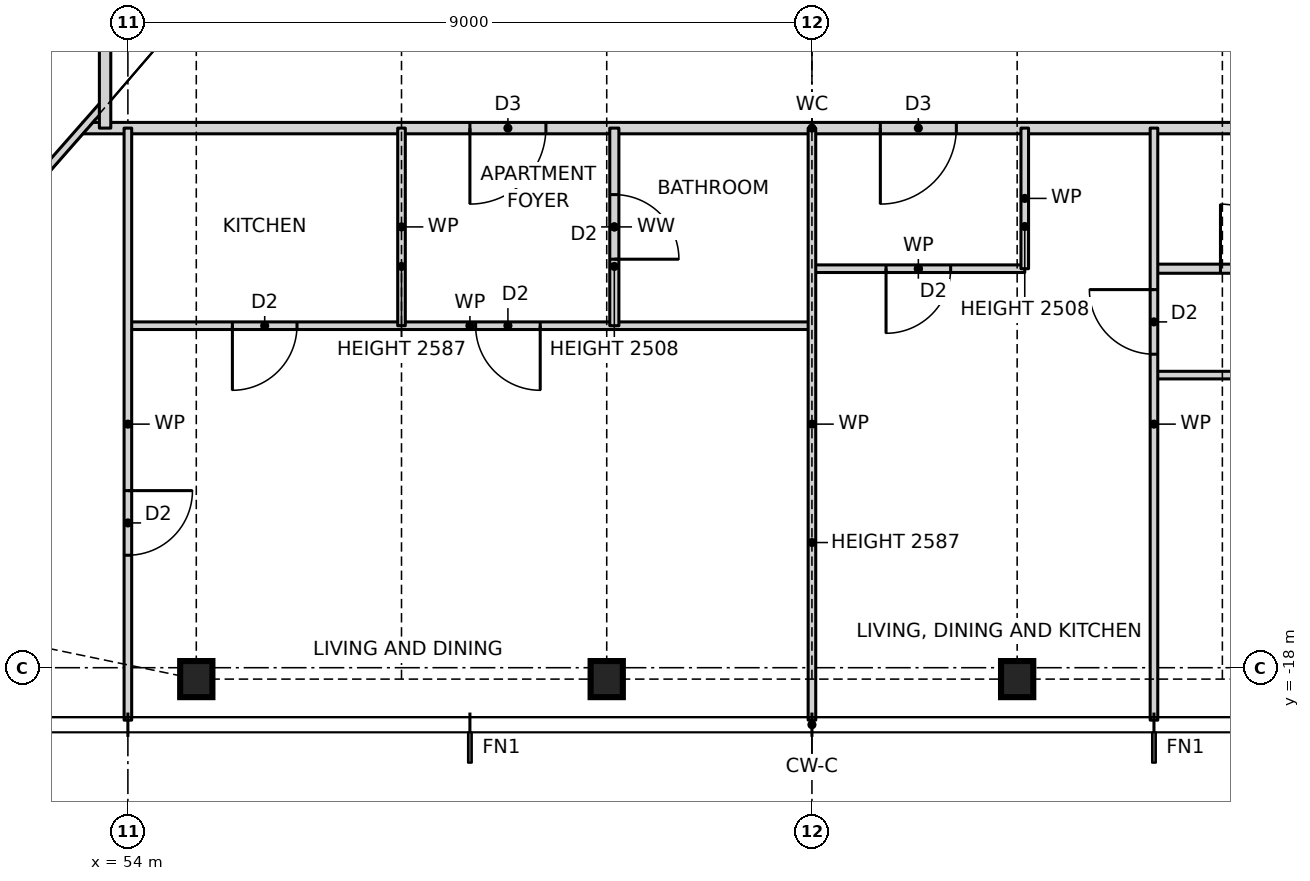
"""IFC4 building model, lengths in metres.
Left out: names, types, materials, properties, quantities, classifications, styles, units other than length and angle.
Written with IfcOpenShell. Run it as: python <this file> out.ifc"""

import sys

from ifc_helpers import new_model, si_unit, direction, frame, frame_2d, origin, origin_2d, place, context, subcontext, project, spatial, rectangle, i_section, extrude, element, fill, save


model = new_model("IFC4")
c1 = context("Model", 3, precision=1e-05, world=origin(), true_north=direction((0.0, 1.0)))
c2 = subcontext(c1, "Body", "Model", "MODEL_VIEW")
j1 = project(units=[si_unit("LENGTHUNIT", "METRE"), si_unit("PLANEANGLEUNIT", "RADIAN")], contexts=[c1])
p1 = place(None, origin())
s1 = spatial("IfcSite", under=j1, at=p1, CompositionType="ELEMENT")
p2 = place(p1, origin())
s2 = spatial("IfcBuilding", under=s1, at=p2, CompositionType="ELEMENT")
p3 = place(p2, frame((0.0, 0.0, 64.0)))
s3 = spatial("IfcBuildingStorey", under=s2, at=p3, CompositionType="ELEMENT", Elevation=64.0)
for number, where, z_axis, x_axis in (
    (1, (54.9, -18.15, 0.0), (0.0, 0.0, 1.0), (1.0, 0.0, 0.0)),
    (2, (60.3, -18.15, 0.0), (0.0, 0.0, 1.0), (1.0, 0.0, 0.0)),
    (3, (65.7, -18.15, 0.0), (0.0, 0.0, 1.0), (1.0, 0.0, 0.0)),
):
    element("IfcColumn", number, at=place(p3, frame(where, z_axis=z_axis, x_axis=x_axis)), inside=s3, PredefinedType="COLUMN", context=c2, shape_type="SweptSolid", body=[
        extrude(i_section(OverallWidth=0.424, OverallDepth=0.475, WebThickness=0.048, FlangeThickness=0.077, at=origin_2d()), origin(), (0.0, 0.0, 1.0), 3.5),
    ])
p4 = place(p3, frame((67.5, -14.15, 0.0), z_axis=(0.0, 0.0, 1.0), x_axis=(1.0, 0.0, 0.0)))
e4 = element("IfcWall", 4, at=p4, inside=s3, PredefinedType="PARTITIONING", context=c2, shape_type="SweptSolid", body=[
    extrude(rectangle(XDim=6.7, YDim=0.1, at=frame_2d((3.35, 0.0))), origin(), (0.0, 0.0, 1.0), 3.27),
])
p5 = place(p4, frame((1.825, 0.0, 0.0)))
e5 = element("IfcOpeningElement", 5, at=p5, cuts=e4, PredefinedType="OPENING", context=c2, shape_type="SweptSolid", body=[
    extrude(rectangle(XDim=0.85, YDim=2.1, at=frame_2d((0.425, 1.05))), frame((0.0, 0.06, 0.0), z_axis=(0.0, -1.0, 0.0), x_axis=(1.0, 0.0, 0.0)), (0.0, 0.0, 1.0), 0.12),
])
p6 = place(p4, frame((5.175, 0.0, 0.0)))
e6 = element("IfcOpeningElement", 6, at=p6, cuts=e4, PredefinedType="OPENING", context=c2, shape_type="SweptSolid", body=[
    extrude(rectangle(XDim=0.85, YDim=2.1, at=frame_2d((0.425, 1.05))), frame((0.0, 0.06, 0.0), z_axis=(0.0, -1.0, 0.0), x_axis=(1.0, 0.0, 0.0)), (0.0, 0.0, 1.0), 0.12),
])
p7 = place(p3, frame((54.0, -13.5, 0.0), z_axis=(0.0, 0.0, 1.0), x_axis=(1.0, 0.0, 0.0)))
e7 = element("IfcWall", 7, at=p7, inside=s3, PredefinedType="PARTITIONING", context=c2, shape_type="SweptSolid", body=[
    extrude(rectangle(XDim=9.0, YDim=0.1, at=frame_2d((4.5, 0.0))), origin(), (0.0, 0.0, 1.0), 3.27),
])
p8 = place(p7, frame((1.375, 0.0, 0.0)))
e8 = element("IfcOpeningElement", 8, at=p8, cuts=e7, PredefinedType="OPENING", context=c2, shape_type="SweptSolid", body=[
    extrude(rectangle(XDim=0.85, YDim=2.1, at=frame_2d((0.425, 1.05))), frame((0.0, 0.06, 0.0), z_axis=(0.0, -1.0, 0.0), x_axis=(1.0, 0.0, 0.0)), (0.0, 0.0, 1.0), 0.12),
])
p9 = place(p7, frame((4.575, 0.0, 0.0)))
e9 = element("IfcOpeningElement", 9, at=p9, cuts=e7, PredefinedType="OPENING", context=c2, shape_type="SweptSolid", body=[
    extrude(rectangle(XDim=0.85, YDim=2.1, at=frame_2d((0.425, 1.05))), frame((0.0, 0.06, 0.0), z_axis=(0.0, -1.0, 0.0), x_axis=(1.0, 0.0, 0.0)), (0.0, 0.0, 1.0), 0.12),
])
p10 = place(p3, frame((63.0, -12.75, 0.0), z_axis=(0.0, 0.0, 1.0), x_axis=(1.0, 0.0, 0.0)))
e10 = element("IfcWall", 10, at=p10, inside=s3, PredefinedType="PARTITIONING", context=c2, shape_type="SweptSolid", body=[
    extrude(rectangle(XDim=2.8, YDim=0.1, at=frame_2d((1.4, 0.0))), origin(), (0.0, 0.0, 1.0), 3.27),
])
p11 = place(p10, frame((0.975, 0.0, 0.0)))
e11 = element("IfcOpeningElement", 11, at=p11, cuts=e10, PredefinedType="OPENING", context=c2, shape_type="SweptSolid", body=[
    extrude(rectangle(XDim=0.85, YDim=2.1, at=frame_2d((0.425, 1.05))), frame((0.0, 0.06, 0.0), z_axis=(0.0, -1.0, 0.0), x_axis=(1.0, 0.0, 0.0)), (0.0, 0.0, 1.0), 0.12),
])
p12 = place(p3, frame((67.5, -12.75, 0.0), z_axis=(0.0, 0.0, 1.0), x_axis=(1.0, 0.0, 0.0)))
e12 = element("IfcWall", 12, at=p12, inside=s3, PredefinedType="PARTITIONING", context=c2, shape_type="SweptSolid", body=[
    extrude(rectangle(XDim=6.7, YDim=0.12, at=frame_2d((3.35, 0.0))), origin(), (0.0, 0.0, 1.0), 3.27),
])
p13 = place(p12, frame((0.875, 0.0, 0.0)))
e13 = element("IfcOpeningElement", 13, at=p13, cuts=e12, PredefinedType="OPENING", context=c2, shape_type="SweptSolid", body=[
    extrude(rectangle(XDim=0.85, YDim=2.1, at=frame_2d((0.425, 1.05))), frame((0.0, 0.07, 0.0), z_axis=(0.0, -1.0, 0.0), x_axis=(1.0, 0.0, 0.0)), (0.0, 0.0, 1.0), 0.14),
])
p14 = place(p12, frame((4.225, 0.0, 0.0)))
e14 = element("IfcOpeningElement", 14, at=p14, cuts=e12, PredefinedType="OPENING", context=c2, shape_type="SweptSolid", body=[
    extrude(rectangle(XDim=0.85, YDim=2.1, at=frame_2d((0.425, 1.05))), frame((0.0, 0.07, 0.0), z_axis=(0.0, -1.0, 0.0), x_axis=(1.0, 0.0, 0.0)), (0.0, 0.0, 1.0), 0.14),
])
p15 = place(p3, frame((53.408, -10.9, 0.0), z_axis=(0.0, 0.0, 1.0), x_axis=(1.0, 0.0, 0.0)))
e15 = element("IfcWall", 15, at=p15, inside=s3, PredefinedType="PARTITIONING", context=c2, shape_type="SweptSolid", body=[
    extrude(rectangle(XDim=19.184, YDim=0.15, at=frame_2d((9.592, 0.0))), origin(), (0.0, 0.0, 1.0), 3.27),
])
p16 = place(p15, frame((5.092, 0.0, 0.0)))
e16 = element("IfcOpeningElement", 16, at=p16, cuts=e15, PredefinedType="OPENING", context=c2, shape_type="SweptSolid", body=[
    extrude(rectangle(XDim=1.0, YDim=2.1, at=frame_2d((0.5, 1.05))), frame((0.0, 0.085, 0.0), z_axis=(0.0, -1.0, 0.0), x_axis=(1.0, 0.0, 0.0)), (0.0, 0.0, 1.0), 0.17),
])
p17 = place(p15, frame((10.492, 0.0, 0.0)))
e17 = element("IfcOpeningElement", 17, at=p17, cuts=e15, PredefinedType="OPENING", context=c2, shape_type="SweptSolid", body=[
    extrude(rectangle(XDim=1.0, YDim=2.1, at=frame_2d((0.5, 1.05))), frame((0.0, 0.085, 0.0), z_axis=(0.0, -1.0, 0.0), x_axis=(1.0, 0.0, 0.0)), (0.0, 0.0, 1.0), 0.17),
])
p18 = place(p3, frame((47.944, -17.109, 0.0), z_axis=(0.0, 0.0, 1.0), x_axis=(0.660612734851, 0.750726857487, 0.0)))
e18 = element("IfcWall", 18, at=p18, inside=s3, PredefinedType="PARTITIONING", context=c2, shape_type="SweptSolid", body=[
    extrude(rectangle(XDim=8.713, YDim=0.1, at=frame_2d((4.356, 0.0))), origin(), (0.0, 0.0, 1.0), 2.429),
])
p19 = place(p3, frame((67.5, -18.69, 0.0), z_axis=(0.0, 0.0, 1.0), x_axis=(0.0, 1.0, 0.0)))
e19 = element("IfcWall", 19, at=p19, inside=s3, PredefinedType="PARTITIONING", context=c2, shape_type="SweptSolid", body=[
    extrude(rectangle(XDim=7.79, YDim=0.1, at=frame_2d((3.895, 0.0))), origin(), (0.0, 0.0, 1.0), 3.27),
])
p20 = place(p19, frame((4.815, 0.0, 0.0)))
e20 = element("IfcOpeningElement", 20, at=p20, cuts=e19, PredefinedType="OPENING", context=c2, shape_type="SweptSolid", body=[
    extrude(rectangle(XDim=0.85, YDim=2.1, at=frame_2d((0.425, 1.05))), frame((0.0, 0.06, 0.0), z_axis=(0.0, -1.0, 0.0), x_axis=(1.0, 0.0, 0.0)), (0.0, 0.0, 1.0), 0.12),
])
p21 = place(p3, frame((65.8, -12.75, 0.0), z_axis=(0.0, 0.0, 1.0), x_axis=(0.0, 1.0, 0.0)))
e21 = element("IfcWall", 21, at=p21, inside=s3, PredefinedType="PARTITIONING", context=c2, shape_type="SweptSolid", body=[
    extrude(rectangle(XDim=1.85, YDim=0.1, at=frame_2d((0.925, 0.0))), origin(), (0.0, 0.0, 1.0), 2.508),
])
p22 = place(p3, frame((63.0, -18.69, 0.0), z_axis=(0.0, 0.0, 1.0), x_axis=(0.0, 1.0, 0.0)))
e22 = element("IfcWall", 22, at=p22, inside=s3, PredefinedType="PARTITIONING", context=c2, shape_type="SweptSolid", body=[
    extrude(rectangle(XDim=7.79, YDim=0.1, at=frame_2d((3.895, 0.0))), origin(), (0.0, 0.0, 1.0), 2.587),
])
p23 = place(p3, frame((60.4, -13.5, 0.0), z_axis=(0.0, 0.0, 1.0), x_axis=(0.0, 1.0, 0.0)))
e23 = element("IfcWall", 23, at=p23, inside=s3, PredefinedType="PARTITIONING", context=c2, shape_type="SweptSolid", body=[
    extrude(rectangle(XDim=2.6, YDim=0.12, at=frame_2d((1.3, 0.0))), origin(), (0.0, 0.0, 1.0), 2.508),
])
p24 = place(p23, frame((0.875, 0.0, 0.0)))
e24 = element("IfcOpeningElement", 24, at=p24, cuts=e23, PredefinedType="OPENING", context=c2, shape_type="SweptSolid", body=[
    extrude(rectangle(XDim=0.85, YDim=2.1, at=frame_2d((0.425, 1.05))), frame((0.0, 0.07, 0.0), z_axis=(0.0, -1.0, 0.0), x_axis=(1.0, 0.0, 0.0)), (0.0, 0.0, 1.0), 0.14),
])
p25 = place(p3, frame((57.6, -13.5, 0.0), z_axis=(0.0, 0.0, 1.0), x_axis=(0.0, 1.0, 0.0)))
e25 = element("IfcWall", 25, at=p25, inside=s3, PredefinedType="PARTITIONING", context=c2, shape_type="SweptSolid", body=[
    extrude(rectangle(XDim=2.6, YDim=0.1, at=frame_2d((1.3, 0.0))), origin(), (0.0, 0.0, 1.0), 2.587),
])
p26 = place(p3, frame((54.0, -18.69, 0.0), z_axis=(0.0, 0.0, 1.0), x_axis=(0.0, 1.0, 0.0)))
e26 = element("IfcWall", 26, at=p26, inside=s3, PredefinedType="PARTITIONING", context=c2, shape_type="SweptSolid", body=[
    extrude(rectangle(XDim=7.79, YDim=0.1, at=frame_2d((3.895, 0.0))), origin(), (0.0, 0.0, 1.0), 3.27),
])
p27 = place(p26, frame((2.17, 0.0, 0.0)))
e27 = element("IfcOpeningElement", 27, at=p27, cuts=e26, PredefinedType="OPENING", context=c2, shape_type="SweptSolid", body=[
    extrude(rectangle(XDim=0.85, YDim=2.1, at=frame_2d((0.425, 1.05))), frame((0.0, 0.06, 0.0), z_axis=(0.0, -1.0, 0.0), x_axis=(1.0, 0.0, 0.0)), (0.0, 0.0, 1.0), 0.12),
])
p28 = place(p3, frame((53.7, -10.9, 0.0), z_axis=(0.0, 0.0, 1.0), x_axis=(0.0, 1.0, 0.0)))
e28 = element("IfcWall", 28, at=p28, inside=s3, PredefinedType="PARTITIONING", context=c2, shape_type="SweptSolid", body=[
    extrude(rectangle(XDim=21.468, YDim=0.15, at=frame_2d((10.734, 0.0))), origin(), (0.0, 0.0, 1.0), 3.27),
])
p29 = place(p28, frame((16.65, 0.0, 0.0)))
e29 = element("IfcOpeningElement", 29, at=p29, cuts=e28, PredefinedType="OPENING", context=c2, shape_type="SweptSolid", body=[
    extrude(rectangle(XDim=1.0, YDim=2.1, at=frame_2d((0.5, 1.05))), frame((0.0, 0.085, 0.0), z_axis=(0.0, -1.0, 0.0), x_axis=(1.0, 0.0, 0.0)), (0.0, 0.0, 1.0), 0.17),
])
p30 = place(p28, frame((11.25, 0.0, 0.0)))
e30 = element("IfcOpeningElement", 30, at=p30, cuts=e28, PredefinedType="OPENING", context=c2, shape_type="SweptSolid", body=[
    extrude(rectangle(XDim=1.0, YDim=2.1, at=frame_2d((0.5, 1.05))), frame((0.0, 0.085, 0.0), z_axis=(0.0, -1.0, 0.0), x_axis=(1.0, 0.0, 0.0)), (0.0, 0.0, 1.0), 0.17),
])
p31 = place(p8, frame((0.85, 0.0, 0.0), z_axis=(0.0, 0.0, 1.0), x_axis=(-1.0, 0.0, 0.0)))
e31 = element("IfcDoor", 31, at=p31, inside=s3, OperationType="SINGLE_SWING_RIGHT", PredefinedType="DOOR", context=c2, shape_type="SweptSolid", body=[
    extrude(rectangle(XDim=0.85, YDim=2.1, at=frame_2d((0.425, 1.05))), frame((0.0, 0.025, 0.0), z_axis=(0.0, -1.0, 0.0), x_axis=(1.0, 0.0, 0.0)), (0.0, 0.0, 1.0), 0.05),
])
fill(e8, e31)
p32 = place(p16, frame((1.0, 0.0, 0.0), z_axis=(0.0, 0.0, 1.0), x_axis=(-1.0, 0.0, 0.0)))
e32 = element("IfcDoor", 32, at=p32, inside=s3, OperationType="SINGLE_SWING_RIGHT", PredefinedType="DOOR", context=c2, shape_type="SweptSolid", body=[
    extrude(rectangle(XDim=1.0, YDim=2.1, at=frame_2d((0.5, 1.05))), frame((0.0, 0.025, 0.0), z_axis=(0.0, -1.0, 0.0), x_axis=(1.0, 0.0, 0.0)), (0.0, 0.0, 1.0), 0.05),
])
fill(e16, e32)
p33 = place(p9, frame((0.85, 0.0, 0.0), z_axis=(0.0, 0.0, 1.0), x_axis=(-1.0, 0.0, 0.0)))
e33 = element("IfcDoor", 33, at=p33, inside=s3, OperationType="SINGLE_SWING_LEFT", PredefinedType="DOOR", context=c2, shape_type="SweptSolid", body=[
    extrude(rectangle(XDim=0.85, YDim=2.1, at=frame_2d((0.425, 1.05))), frame((0.0, 0.025, 0.0), z_axis=(0.0, -1.0, 0.0), x_axis=(1.0, 0.0, 0.0)), (0.0, 0.0, 1.0), 0.05),
])
fill(e9, e33)
p34 = place(p24, frame((0.85, 0.0, 0.0), z_axis=(0.0, 0.0, 1.0), x_axis=(-1.0, 0.0, 0.0)))
e34 = element("IfcDoor", 34, at=p34, inside=s3, OperationType="SINGLE_SWING_RIGHT", PredefinedType="DOOR", context=c2, shape_type="SweptSolid", body=[
    extrude(rectangle(XDim=0.85, YDim=2.1, at=frame_2d((0.425, 1.05))), frame((0.0, 0.025, 0.0), z_axis=(0.0, -1.0, 0.0), x_axis=(1.0, 0.0, 0.0)), (0.0, 0.0, 1.0), 0.05),
])
fill(e24, e34)
p35 = place(p27, frame((0.85, 0.0, 0.0), z_axis=(0.0, 0.0, 1.0), x_axis=(-1.0, 0.0, 0.0)))
e35 = element("IfcDoor", 35, at=p35, inside=s3, OperationType="SINGLE_SWING_LEFT", PredefinedType="DOOR", context=c2, shape_type="SweptSolid", body=[
    extrude(rectangle(XDim=0.85, YDim=2.1, at=frame_2d((0.425, 1.05))), frame((0.0, 0.025, 0.0), z_axis=(0.0, -1.0, 0.0), x_axis=(1.0, 0.0, 0.0)), (0.0, 0.0, 1.0), 0.05),
])
fill(e27, e35)
p36 = place(p17, frame((1.0, 0.0, 0.0), z_axis=(0.0, 0.0, 1.0), x_axis=(-1.0, 0.0, 0.0)))
e36 = element("IfcDoor", 36, at=p36, inside=s3, OperationType="SINGLE_SWING_RIGHT", PredefinedType="DOOR", context=c2, shape_type="SweptSolid", body=[
    extrude(rectangle(XDim=1.0, YDim=2.1, at=frame_2d((0.5, 1.05))), frame((0.0, 0.025, 0.0), z_axis=(0.0, -1.0, 0.0), x_axis=(1.0, 0.0, 0.0)), (0.0, 0.0, 1.0), 0.05),
])
fill(e17, e36)
p37 = place(p11, frame((0.85, 0.0, 0.0), z_axis=(0.0, 0.0, 1.0), x_axis=(-1.0, 0.0, 0.0)))
e37 = element("IfcDoor", 37, at=p37, inside=s3, OperationType="SINGLE_SWING_RIGHT", PredefinedType="DOOR", context=c2, shape_type="SweptSolid", body=[
    extrude(rectangle(XDim=0.85, YDim=2.1, at=frame_2d((0.425, 1.05))), frame((0.0, 0.025, 0.0), z_axis=(0.0, -1.0, 0.0), x_axis=(1.0, 0.0, 0.0)), (0.0, 0.0, 1.0), 0.05),
])
fill(e11, e37)
p38 = place(p20, origin())
e38 = element("IfcDoor", 38, at=p38, inside=s3, OperationType="SINGLE_SWING_RIGHT", PredefinedType="DOOR", context=c2, shape_type="SweptSolid", body=[
    extrude(rectangle(XDim=0.85, YDim=2.1, at=frame_2d((0.425, 1.05))), frame((0.0, 0.025, 0.0), z_axis=(0.0, -1.0, 0.0), x_axis=(1.0, 0.0, 0.0)), (0.0, 0.0, 1.0), 0.05),
])
fill(e20, e38)
p39 = place(p13, origin())
e39 = element("IfcDoor", 39, at=p39, inside=s3, OperationType="SINGLE_SWING_LEFT", PredefinedType="DOOR", context=c2, shape_type="SweptSolid", body=[
    extrude(rectangle(XDim=0.85, YDim=2.1, at=frame_2d((0.425, 1.05))), frame((0.0, 0.025, 0.0), z_axis=(0.0, -1.0, 0.0), x_axis=(1.0, 0.0, 0.0)), (0.0, 0.0, 1.0), 0.05),
])
fill(e13, e39)
save(model, sys.argv[1])
